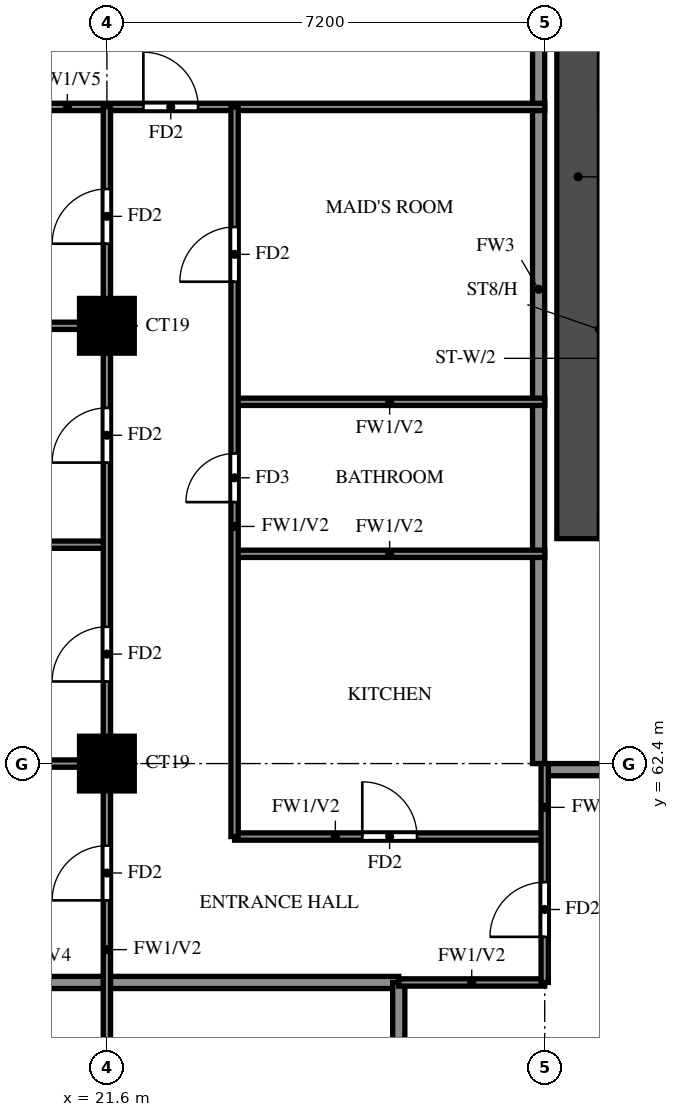
"""IFC4 building model, lengths in metres.
Left out: names, types, materials, properties, quantities, classifications, styles, units other than length and angle.
Written with IfcOpenShell. Run it as: python <this file> out.ifc"""

import sys

from ifc_helpers import new_model, si_unit, direction, frame, frame_2d, origin, origin_2d, place, context, subcontext, project, spatial, rectangle, extrude, source, transform, mapped, element, fill, save


model = new_model("IFC4")
c1 = context("Model", 3, precision=1e-05, world=origin(), true_north=direction((0.0, 1.0)))
c2 = subcontext(c1, "Body", "Model", "MODEL_VIEW")
j1 = project(units=[si_unit("LENGTHUNIT", "METRE"), si_unit("PLANEANGLEUNIT", "RADIAN")], contexts=[c1])
p1 = place(None, origin())
s1 = spatial("IfcSite", under=j1, at=p1, CompositionType="ELEMENT")
p2 = place(p1, origin())
s2 = spatial("IfcBuilding", under=s1, at=p2, CompositionType="ELEMENT")
p3 = place(p2, frame((0.0, 0.0, 192.0)))
s3 = spatial("IfcBuildingStorey", under=s2, at=p3, CompositionType="ELEMENT", Elevation=192.0)
m1 = source(origin(), c2, "Body", "SweptSolid", [
    extrude(rectangle(XDim=0.9, YDim=0.9, at=origin_2d()), origin(), (0.0, 0.0, 1.0), 3.2),
])
for number, where, z_axis, x_axis in (
    (1, (21.6, 62.4, 0.0), (0.0, 0.0, 1.0), (1.0, 0.0, 0.0)),
    (2, (21.6, 69.6, 0.0), (0.0, 0.0, 1.0), (1.0, 0.0, 0.0)),
):
    element("IfcColumn", number, at=place(p3, frame(where, z_axis=z_axis, x_axis=x_axis)), inside=s3, PredefinedType="COLUMN", context=c2, shape_type="MappedRepresentation", body=[
        mapped(m1, transform((0.0, 0.0, 0.0))),
    ])
p4 = place(p3, frame((29.35, 66.1, 0.0), z_axis=(0.0, 0.0, 1.0), x_axis=(0.0, 1.0, 0.0)))
e3 = element("IfcWall", 3, at=p4, inside=s3, PredefinedType="SHEAR", context=c2, shape_type="SweptSolid", body=[
    extrude(rectangle(XDim=11.9, YDim=0.7, at=frame_2d((5.95, 0.0))), origin(), (0.0, 0.0, 1.0), 3.2),
])
p5 = place(p3, frame((28.8, 62.3, 0.0), z_axis=(0.0, 0.0, 1.0), x_axis=(1.0, 0.0, 0.0)))
e4 = element("IfcWall", 4, at=p5, inside=s3, PredefinedType="SOLIDWALL", context=c2, shape_type="SweptSolid", body=[
    extrude(rectangle(XDim=4.8, YDim=0.2, at=frame_2d((2.4, 0.0))), origin(), (0.0, 0.0, 1.0), 3.2),
])
p6 = place(p3, frame((28.7, 62.4, 0.0), z_axis=(0.0, 0.0, 1.0), x_axis=(0.0, 1.0, 0.0)))
e5 = element("IfcWall", 5, at=p6, inside=s3, PredefinedType="SOLIDWALL", context=c2, shape_type="SweptSolid", body=[
    extrude(rectangle(XDim=15.6, YDim=0.2, at=frame_2d((7.8, 0.0))), origin(), (0.0, 0.0, 1.0), 3.2),
])
p7 = place(p3, frame((14.525, 58.8, 0.0), z_axis=(0.0, 0.0, 1.0), x_axis=(1.0, 0.0, 0.0)))
e6 = element("IfcWall", 6, at=p7, inside=s3, PredefinedType="SOLIDWALL", context=c2, shape_type="SweptSolid", body=[
    extrude(rectangle(XDim=11.875, YDim=0.2, at=frame_2d((5.938, 0.0))), origin(), (0.0, 0.0, 1.0), 2.3),
])
p8 = place(p3, frame((26.4, 56.4, 0.0), z_axis=(0.0, 0.0, 1.0), x_axis=(0.0, 1.0, 0.0)))
e7 = element("IfcWall", 7, at=p8, inside=s3, PredefinedType="SOLIDWALL", context=c2, shape_type="SweptSolid", body=[
    extrude(rectangle(XDim=2.4, YDim=0.2, at=frame_2d((1.2, 0.0))), origin(), (0.0, 0.0, 1.0), 3.2),
])
p9 = place(p3, frame((26.4, 58.8, 0.0), z_axis=(0.0, 0.0, 1.0), x_axis=(1.0, 0.0, 0.0)))
e8 = element("IfcWall", 8, at=p9, inside=s3, PredefinedType="PARTITIONING", context=c2, shape_type="SweptSolid", body=[
    extrude(rectangle(XDim=2.4, YDim=0.12, at=frame_2d((1.2, 0.0))), origin(), (0.0, 0.0, 1.0), 3.2),
])
p10 = place(p3, frame((23.7, 61.2, 0.0), z_axis=(0.0, 0.0, 1.0), x_axis=(1.0, 0.0, 0.0)))
e9 = element("IfcWall", 9, at=p10, inside=s3, PredefinedType="PARTITIONING", context=c2, shape_type="SweptSolid", body=[
    extrude(rectangle(XDim=5.1, YDim=0.12, at=frame_2d((2.55, 0.0))), origin(), (0.0, 0.0, 1.0), 3.2),
])
p11 = place(p10, frame((2.1, 0.0, 0.0)))
e10 = element("IfcOpeningElement", 10, at=p11, cuts=e9, PredefinedType="OPENING", context=c2, shape_type="SweptSolid", body=[
    extrude(rectangle(XDim=0.9, YDim=2.1, at=frame_2d((0.45, 1.05))), frame((0.0, 0.07, 0.0), z_axis=(0.0, -1.0, 0.0), x_axis=(1.0, 0.0, 0.0)), (0.0, 0.0, 1.0), 0.14),
])
p12 = place(p3, frame((14.525, 62.4, 0.0), z_axis=(0.0, 0.0, 1.0), x_axis=(1.0, 0.0, 0.0)))
e11 = element("IfcWall", 11, at=p12, inside=s3, PredefinedType="PARTITIONING", context=c2, shape_type="SweptSolid", body=[
    extrude(rectangle(XDim=7.075, YDim=0.12, at=frame_2d((3.538, 0.0))), origin(), (0.0, 0.0, 1.0), 3.2),
])
p13 = place(p3, frame((23.7, 65.85, 0.0), z_axis=(0.0, 0.0, 1.0), x_axis=(1.0, 0.0, 0.0)))
e12 = element("IfcWall", 12, at=p13, inside=s3, PredefinedType="PARTITIONING", context=c2, shape_type="SweptSolid", body=[
    extrude(rectangle(XDim=5.1, YDim=0.12, at=frame_2d((2.55, 0.0))), origin(), (0.0, 0.0, 1.0), 3.2),
])
p14 = place(p3, frame((14.525, 66.0, 0.0), z_axis=(0.0, 0.0, 1.0), x_axis=(1.0, 0.0, 0.0)))
e13 = element("IfcWall", 13, at=p14, inside=s3, PredefinedType="PARTITIONING", context=c2, shape_type="SweptSolid", body=[
    extrude(rectangle(XDim=7.075, YDim=0.12, at=frame_2d((3.538, 0.0))), origin(), (0.0, 0.0, 1.0), 2.3),
])
p15 = place(p3, frame((23.7, 68.35, 0.0), z_axis=(0.0, 0.0, 1.0), x_axis=(1.0, 0.0, 0.0)))
e14 = element("IfcWall", 14, at=p15, inside=s3, PredefinedType="PARTITIONING", context=c2, shape_type="SweptSolid", body=[
    extrude(rectangle(XDim=5.1, YDim=0.12, at=frame_2d((2.55, 0.0))), origin(), (0.0, 0.0, 1.0), 3.2),
])
p16 = place(p3, frame((14.525, 69.6, 0.0), z_axis=(0.0, 0.0, 1.0), x_axis=(1.0, 0.0, 0.0)))
e15 = element("IfcWall", 15, at=p16, inside=s3, PredefinedType="PARTITIONING", context=c2, shape_type="SweptSolid", body=[
    extrude(rectangle(XDim=7.075, YDim=0.12, at=frame_2d((3.538, 0.0))), origin(), (0.0, 0.0, 1.0), 3.2),
])
p17 = place(p3, frame((14.525, 73.2, 0.0), z_axis=(0.0, 0.0, 1.0), x_axis=(1.0, 0.0, 0.0)))
e16 = element("IfcWall", 16, at=p17, inside=s3, PredefinedType="PARTITIONING", context=c2, shape_type="SweptSolid", body=[
    extrude(rectangle(XDim=14.275, YDim=0.12, at=frame_2d((7.138, 0.0))), origin(), (0.0, 0.0, 1.0), 2.3),
])
p18 = place(p17, frame((7.675, 0.0, 0.0)))
e17 = element("IfcOpeningElement", 17, at=p18, cuts=e16, PredefinedType="OPENING", context=c2, shape_type="SweptSolid", body=[
    extrude(rectangle(XDim=0.9, YDim=2.1, at=frame_2d((0.45, 1.05))), frame((0.0, 0.07, 0.0), z_axis=(0.0, -1.0, 0.0), x_axis=(1.0, 0.0, 0.0)), (0.0, 0.0, 1.0), 0.14),
])
p19 = place(p3, frame((21.6, 48.0, 0.0), z_axis=(0.0, 0.0, 1.0), x_axis=(0.0, 1.0, 0.0)))
e18 = element("IfcWall", 18, at=p19, inside=s3, PredefinedType="PARTITIONING", context=c2, shape_type="SweptSolid", body=[
    extrude(rectangle(XDim=25.2, YDim=0.12, at=frame_2d((12.6, 0.0))), origin(), (0.0, 0.0, 1.0), 3.2),
])
p20 = place(p19, frame((1.35, 0.0, 0.0)))
e19 = element("IfcOpeningElement", 19, at=p20, cuts=e18, PredefinedType="OPENING", context=c2, shape_type="SweptSolid", body=[
    extrude(rectangle(XDim=0.9, YDim=2.1, at=frame_2d((0.45, 1.05))), frame((0.0, 0.07, 0.0), z_axis=(0.0, -1.0, 0.0), x_axis=(1.0, 0.0, 0.0)), (0.0, 0.0, 1.0), 0.14),
])
p21 = place(p19, frame((4.95, 0.0, 0.0)))
e20 = element("IfcOpeningElement", 20, at=p21, cuts=e18, PredefinedType="OPENING", context=c2, shape_type="SweptSolid", body=[
    extrude(rectangle(XDim=0.9, YDim=2.1, at=frame_2d((0.45, 1.05))), frame((0.0, 0.07, 0.0), z_axis=(0.0, -1.0, 0.0), x_axis=(1.0, 0.0, 0.0)), (0.0, 0.0, 1.0), 0.14),
])
p22 = place(p19, frame((8.25, 0.0, 0.0)))
e21 = element("IfcOpeningElement", 21, at=p22, cuts=e18, PredefinedType="OPENING", context=c2, shape_type="SweptSolid", body=[
    extrude(rectangle(XDim=1.5, YDim=2.1, at=frame_2d((0.75, 1.05))), frame((0.0, 0.07, 0.0), z_axis=(0.0, -1.0, 0.0), x_axis=(1.0, 0.0, 0.0)), (0.0, 0.0, 1.0), 0.14),
])
p23 = place(p19, frame((12.15, 0.0, 0.0)))
e22 = element("IfcOpeningElement", 22, at=p23, cuts=e18, PredefinedType="OPENING", context=c2, shape_type="SweptSolid", body=[
    extrude(rectangle(XDim=0.9, YDim=2.1, at=frame_2d((0.45, 1.05))), frame((0.0, 0.07, 0.0), z_axis=(0.0, -1.0, 0.0), x_axis=(1.0, 0.0, 0.0)), (0.0, 0.0, 1.0), 0.14),
])
p24 = place(p19, frame((15.75, 0.0, 0.0)))
e23 = element("IfcOpeningElement", 23, at=p24, cuts=e18, PredefinedType="OPENING", context=c2, shape_type="SweptSolid", body=[
    extrude(rectangle(XDim=0.9, YDim=2.1, at=frame_2d((0.45, 1.05))), frame((0.0, 0.07, 0.0), z_axis=(0.0, -1.0, 0.0), x_axis=(1.0, 0.0, 0.0)), (0.0, 0.0, 1.0), 0.14),
])
p25 = place(p19, frame((19.35, 0.0, 0.0)))
e24 = element("IfcOpeningElement", 24, at=p25, cuts=e18, PredefinedType="OPENING", context=c2, shape_type="SweptSolid", body=[
    extrude(rectangle(XDim=0.9, YDim=2.1, at=frame_2d((0.45, 1.05))), frame((0.0, 0.07, 0.0), z_axis=(0.0, -1.0, 0.0), x_axis=(1.0, 0.0, 0.0)), (0.0, 0.0, 1.0), 0.14),
])
p26 = place(p19, frame((22.95, 0.0, 0.0)))
e25 = element("IfcOpeningElement", 25, at=p26, cuts=e18, PredefinedType="OPENING", context=c2, shape_type="SweptSolid", body=[
    extrude(rectangle(XDim=0.9, YDim=2.1, at=frame_2d((0.45, 1.05))), frame((0.0, 0.07, 0.0), z_axis=(0.0, -1.0, 0.0), x_axis=(1.0, 0.0, 0.0)), (0.0, 0.0, 1.0), 0.14),
])
p27 = place(p3, frame((23.7, 61.2, 0.0), z_axis=(0.0, 0.0, 1.0), x_axis=(0.0, 1.0, 0.0)))
e26 = element("IfcWall", 26, at=p27, inside=s3, PredefinedType="PARTITIONING", context=c2, shape_type="SweptSolid", body=[
    extrude(rectangle(XDim=12.0, YDim=0.12, at=frame_2d((6.0, 0.0))), origin(), (0.0, 0.0, 1.0), 3.2),
])
p28 = place(p27, frame((5.5, 0.0, 0.0)))
e27 = element("IfcOpeningElement", 27, at=p28, cuts=e26, PredefinedType="OPENING", context=c2, shape_type="SweptSolid", body=[
    extrude(rectangle(XDim=0.8, YDim=2.1, at=frame_2d((0.4, 1.05))), frame((0.0, 0.07, 0.0), z_axis=(0.0, -1.0, 0.0), x_axis=(1.0, 0.0, 0.0)), (0.0, 0.0, 1.0), 0.14),
])
p29 = place(p27, frame((9.125, 0.0, 0.0)))
e28 = element("IfcOpeningElement", 28, at=p29, cuts=e26, PredefinedType="OPENING", context=c2, shape_type="SweptSolid", body=[
    extrude(rectangle(XDim=0.9, YDim=2.1, at=frame_2d((0.45, 1.05))), frame((0.0, 0.07, 0.0), z_axis=(0.0, -1.0, 0.0), x_axis=(1.0, 0.0, 0.0)), (0.0, 0.0, 1.0), 0.14),
])
p30 = place(p3, frame((28.8, 58.8, 0.0), z_axis=(0.0, 0.0, 1.0), x_axis=(0.0, 1.0, 0.0)))
e29 = element("IfcWall", 29, at=p30, inside=s3, PredefinedType="PARTITIONING", context=c2, shape_type="SweptSolid", body=[
    extrude(rectangle(XDim=3.6, YDim=0.12, at=frame_2d((1.8, 0.0))), origin(), (0.0, 0.0, 1.0), 3.2),
])
p31 = place(p30, frame((0.75, 0.0, 0.0)))
e30 = element("IfcOpeningElement", 30, at=p31, cuts=e29, PredefinedType="OPENING", context=c2, shape_type="SweptSolid", body=[
    extrude(rectangle(XDim=0.9, YDim=2.1, at=frame_2d((0.45, 1.05))), frame((0.0, 0.07, 0.0), z_axis=(0.0, -1.0, 0.0), x_axis=(1.0, 0.0, 0.0)), (0.0, 0.0, 1.0), 0.14),
])
p32 = place(p31, origin())
e31 = element("IfcDoor", 31, at=p32, inside=s3, OperationType="SINGLE_SWING_LEFT", PredefinedType="DOOR", context=c2, shape_type="SweptSolid", body=[
    extrude(rectangle(XDim=0.9, YDim=2.1, at=frame_2d((0.45, 1.05))), frame((0.0, 0.025, 0.0), z_axis=(0.0, -1.0, 0.0), x_axis=(1.0, 0.0, 0.0)), (0.0, 0.0, 1.0), 0.05),
])
fill(e30, e31)
p33 = place(p23, origin())
e32 = element("IfcDoor", 32, at=p33, inside=s3, OperationType="SINGLE_SWING_LEFT", PredefinedType="DOOR", context=c2, shape_type="SweptSolid", body=[
    extrude(rectangle(XDim=0.9, YDim=2.1, at=frame_2d((0.45, 1.05))), frame((0.0, 0.025, 0.0), z_axis=(0.0, -1.0, 0.0), x_axis=(1.0, 0.0, 0.0)), (0.0, 0.0, 1.0), 0.05),
])
fill(e22, e32)
p34 = place(p24, origin())
e33 = element("IfcDoor", 33, at=p34, inside=s3, OperationType="SINGLE_SWING_LEFT", PredefinedType="DOOR", context=c2, shape_type="SweptSolid", body=[
    extrude(rectangle(XDim=0.9, YDim=2.1, at=frame_2d((0.45, 1.05))), frame((0.0, 0.025, 0.0), z_axis=(0.0, -1.0, 0.0), x_axis=(1.0, 0.0, 0.0)), (0.0, 0.0, 1.0), 0.05),
])
fill(e23, e33)
p35 = place(p25, origin())
e34 = element("IfcDoor", 34, at=p35, inside=s3, OperationType="SINGLE_SWING_RIGHT", PredefinedType="DOOR", context=c2, shape_type="SweptSolid", body=[
    extrude(rectangle(XDim=0.9, YDim=2.1, at=frame_2d((0.45, 1.05))), frame((0.0, 0.025, 0.0), z_axis=(0.0, -1.0, 0.0), x_axis=(1.0, 0.0, 0.0)), (0.0, 0.0, 1.0), 0.05),
])
fill(e24, e34)
p36 = place(p26, origin())
e35 = element("IfcDoor", 35, at=p36, inside=s3, OperationType="SINGLE_SWING_LEFT", PredefinedType="DOOR", context=c2, shape_type="SweptSolid", body=[
    extrude(rectangle(XDim=0.9, YDim=2.1, at=frame_2d((0.45, 1.05))), frame((0.0, 0.025, 0.0), z_axis=(0.0, -1.0, 0.0), x_axis=(1.0, 0.0, 0.0)), (0.0, 0.0, 1.0), 0.05),
])
fill(e25, e35)
p37 = place(p18, origin())
e36 = element("IfcDoor", 36, at=p37, inside=s3, OperationType="SINGLE_SWING_LEFT", PredefinedType="DOOR", context=c2, shape_type="SweptSolid", body=[
    extrude(rectangle(XDim=0.9, YDim=2.1, at=frame_2d((0.45, 1.05))), frame((0.0, 0.025, 0.0), z_axis=(0.0, -1.0, 0.0), x_axis=(1.0, 0.0, 0.0)), (0.0, 0.0, 1.0), 0.05),
])
fill(e17, e36)
p38 = place(p11, origin())
e37 = element("IfcDoor", 37, at=p38, inside=s3, OperationType="SINGLE_SWING_RIGHT", PredefinedType="DOOR", context=c2, shape_type="SweptSolid", body=[
    extrude(rectangle(XDim=0.9, YDim=2.1, at=frame_2d((0.45, 1.05))), frame((0.0, 0.025, 0.0), z_axis=(0.0, -1.0, 0.0), x_axis=(1.0, 0.0, 0.0)), (0.0, 0.0, 1.0), 0.05),
])
fill(e10, e37)
p39 = place(p28, origin())
e38 = element("IfcDoor", 38, at=p39, inside=s3, OperationType="SINGLE_SWING_LEFT", PredefinedType="DOOR", context=c2, shape_type="SweptSolid", body=[
    extrude(rectangle(XDim=0.8, YDim=2.1, at=frame_2d((0.4, 1.05))), frame((0.0, 0.025, 0.0), z_axis=(0.0, -1.0, 0.0), x_axis=(1.0, 0.0, 0.0)), (0.0, 0.0, 1.0), 0.05),
])
fill(e27, e38)
p40 = place(p29, origin())
e39 = element("IfcDoor", 39, at=p40, inside=s3, OperationType="SINGLE_SWING_LEFT", PredefinedType="DOOR", context=c2, shape_type="SweptSolid", body=[
    extrude(rectangle(XDim=0.9, YDim=2.1, at=frame_2d((0.45, 1.05))), frame((0.0, 0.025, 0.0), z_axis=(0.0, -1.0, 0.0), x_axis=(1.0, 0.0, 0.0)), (0.0, 0.0, 1.0), 0.05),
])
fill(e28, e39)
save(model, sys.argv[1])
